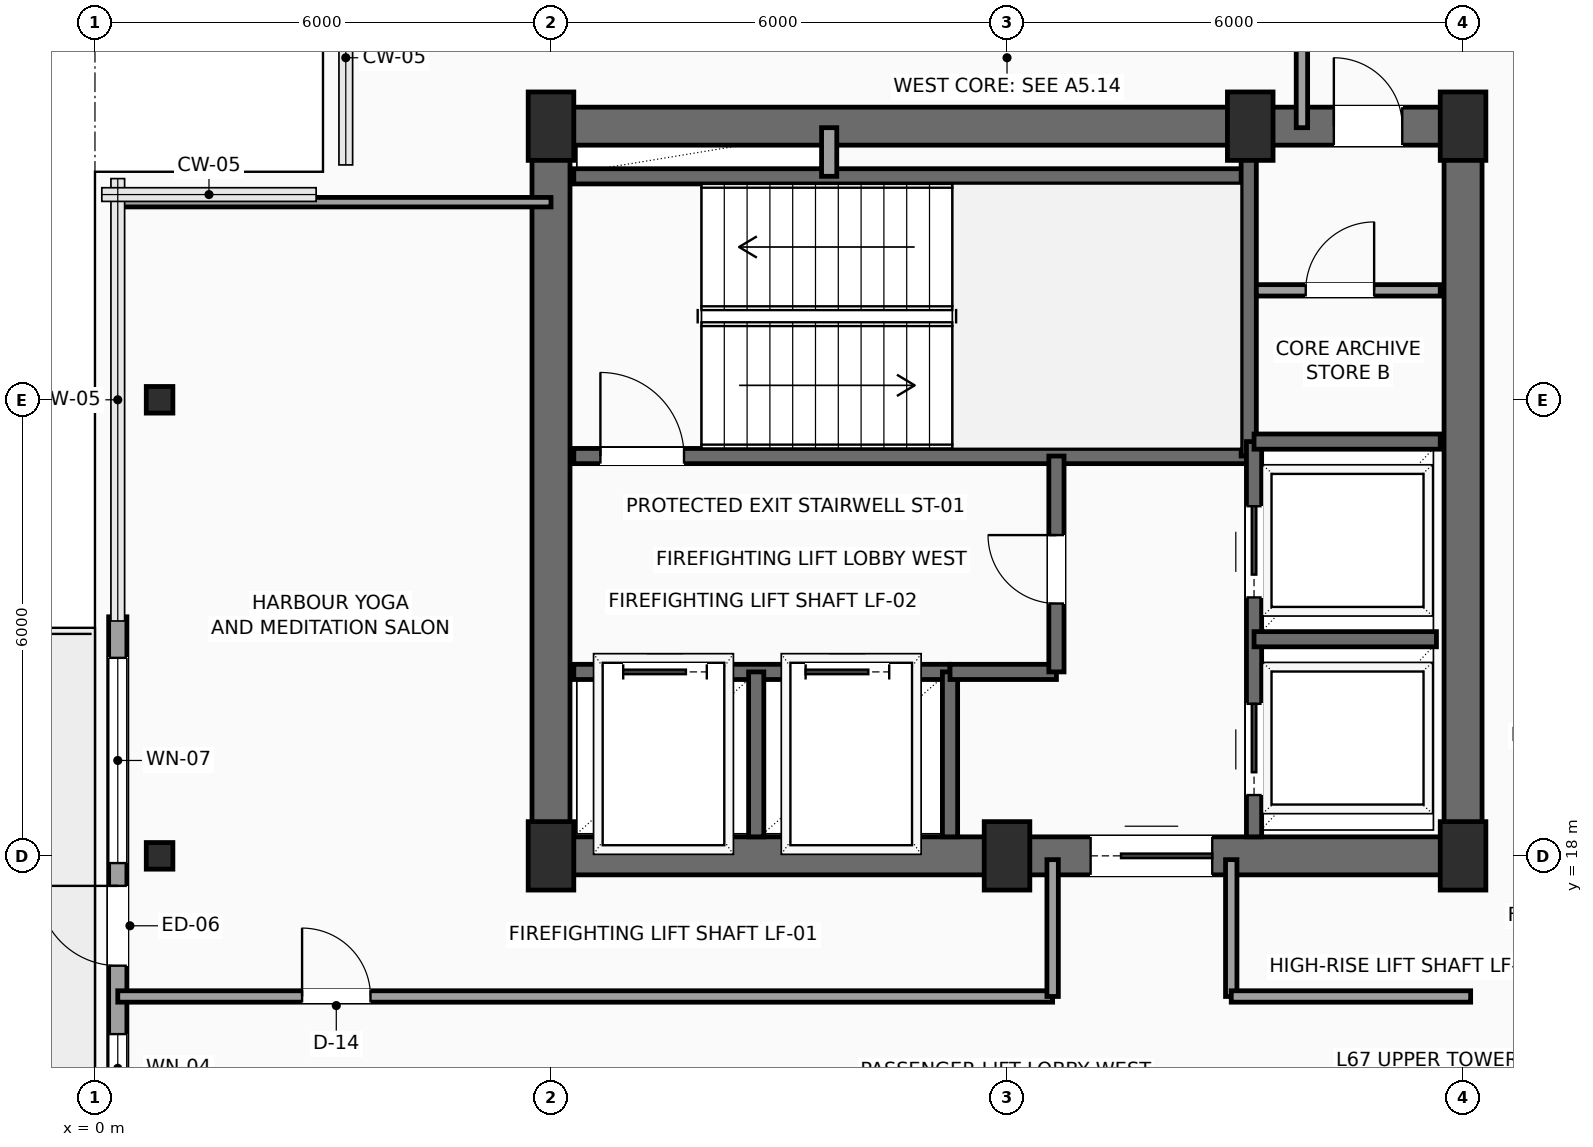
"""IFC4 building model, lengths in metres.
Left out: names, types, materials, properties, quantities, classifications, styles, units other than length and angle.
Written with IfcOpenShell. Run it as: python <this file> out.ifc"""

import sys

from ifc_helpers import new_model, si_unit, direction, frame, frame_2d, origin, origin_2d, place, context, subcontext, project, spatial, rectangle, hollow_rectangle, extrude, element, fill, save


model = new_model("IFC4")
c1 = context("Model", 3, precision=1e-05, world=origin(), true_north=direction((0.0, 1.0)))
c2 = subcontext(c1, "Body", "Model", "MODEL_VIEW")
j1 = project(units=[si_unit("LENGTHUNIT", "METRE"), si_unit("PLANEANGLEUNIT", "RADIAN")], contexts=[c1])
p1 = place(None, origin())
s1 = spatial("IfcSite", under=j1, at=p1, CompositionType="ELEMENT")
p2 = place(p1, origin())
s2 = spatial("IfcBuilding", under=s1, at=p2, CompositionType="ELEMENT")
p3 = place(p2, frame((0.0, 0.0, 267.7)))
s3 = spatial("IfcBuildingStorey", under=s2, at=p3, CompositionType="ELEMENT", Elevation=267.7)
for number, where, z_axis, x_axis in (
    (1, (6.0, 18.0, 0.0), (0.0, 0.0, 1.0), (1.0, 0.0, 0.0)),
    (2, (12.0, 18.0, 0.0), (0.0, 0.0, 1.0), (1.0, 0.0, 0.0)),
    (3, (18.0, 18.0, 0.0), (0.0, 0.0, 1.0), (1.0, 0.0, 0.0)),
    (4, (6.0, 27.6, 0.0), (0.0, 0.0, 1.0), (1.0, 0.0, 0.0)),
    (5, (15.2, 27.6, 0.0), (0.0, 0.0, 1.0), (1.0, 0.0, 0.0)),
    (6, (18.0, 27.6, 0.0), (0.0, 0.0, 1.0), (1.0, 0.0, 0.0)),
):
    element("IfcColumn", number, at=place(p3, frame(where, z_axis=z_axis, x_axis=x_axis)), inside=s3, PredefinedType="COLUMN", context=c2, shape_type="SweptSolid", body=[
        extrude(rectangle(XDim=0.6, YDim=0.9, at=origin_2d()), origin(), (0.0, 0.0, 1.0), 3.5),
    ])
for number, where, z_axis, x_axis in (
    (7, (0.85, 18.0, 0.0), (0.0, 0.0, 1.0), (1.0, 0.0, 0.0)),
    (8, (0.85, 24.0, 0.0), (0.0, 0.0, 1.0), (1.0, 0.0, 0.0)),
):
    element("IfcColumn", number, at=place(p3, frame(where, z_axis=z_axis, x_axis=x_axis)), inside=s3, PredefinedType="COLUMN", context=c2, shape_type="SweptSolid", body=[
        extrude(hollow_rectangle(XDim=0.35, YDim=0.35, WallThickness=0.016, InnerFilletRadius=0.016, OuterFilletRadius=0.032, at=origin_2d()), origin(), (0.0, 0.0, 1.0), 3.5),
    ])
p4 = place(p3, frame((0.3, 11.855, 0.0), z_axis=(0.0, 0.0, 1.0), x_axis=(0.0, 1.0, 0.0)))
e9 = element("IfcWall", 9, at=p4, inside=s3, PredefinedType="SOLIDWALL", context=c2, shape_type="SweptSolid", body=[
    extrude(rectangle(XDim=9.29, YDim=0.24, at=frame_2d((4.645, 0.0))), origin(), (0.0, 0.0, 1.0), 3.3),
])
p5 = place(p4, frame((4.7, 0.0, 0.0)))
e10 = element("IfcOpeningElement", 10, at=p5, cuts=e9, PredefinedType="OPENING", context=c2, shape_type="SweptSolid", body=[
    extrude(rectangle(XDim=1.05, YDim=2.2, at=frame_2d((0.525, 1.1))), frame((0.0, 0.13, 0.0), z_axis=(0.0, -1.0, 0.0), x_axis=(1.0, 0.0, 0.0)), (0.0, 0.0, 1.0), 0.26),
])
p6 = place(p4, frame((6.05, 0.0, 0.6)))
e11 = element("IfcOpeningElement", 11, at=p6, cuts=e9, PredefinedType="OPENING", context=c2, shape_type="SweptSolid", body=[
    extrude(rectangle(XDim=2.7, YDim=2.3, at=frame_2d((1.35, 1.15))), frame((0.0, 0.13, 0.0), z_axis=(0.0, -1.0, 0.0), x_axis=(1.0, 0.0, 0.0)), (0.0, 0.0, 1.0), 0.26),
])
p7 = place(p4, frame((2.9, 0.0, 0.6)))
e12 = element("IfcOpeningElement", 12, at=p7, cuts=e9, PredefinedType="OPENING", context=c2, shape_type="SweptSolid", body=[
    extrude(rectangle(XDim=0.9, YDim=2.2, at=frame_2d((0.45, 1.1))), frame((0.0, 0.13, 0.0), z_axis=(0.0, -1.0, 0.0), x_axis=(1.0, 0.0, 0.0)), (0.0, 0.0, 1.0), 0.26),
])
p8 = place(p3, frame((6.0, 18.0, 0.0), z_axis=(0.0, 0.0, 1.0), x_axis=(1.0, 0.0, 0.0)))
e13 = element("IfcWall", 13, at=p8, inside=s3, PredefinedType="SHEAR", context=c2, shape_type="SweptSolid", body=[
    extrude(rectangle(XDim=12.0, YDim=0.5, at=frame_2d((6.0, 0.0))), origin(), (0.0, 0.0, 1.0), 3.3),
])
p9 = place(p8, frame((7.1, 0.0, 0.0)))
e14 = element("IfcOpeningElement", 14, at=p9, cuts=e13, PredefinedType="OPENING", context=c2, shape_type="SweptSolid", body=[
    extrude(rectangle(XDim=1.6, YDim=2.3, at=frame_2d((0.8, 1.15))), frame((0.0, 0.26, 0.0), z_axis=(0.0, -1.0, 0.0), x_axis=(1.0, 0.0, 0.0)), (0.0, 0.0, 1.0), 0.52),
])
p10 = place(p3, frame((6.0, 27.6, 0.0), z_axis=(0.0, 0.0, 1.0), x_axis=(1.0, 0.0, 0.0)))
e15 = element("IfcWall", 15, at=p10, inside=s3, PredefinedType="SHEAR", context=c2, shape_type="SweptSolid", body=[
    extrude(rectangle(XDim=12.0, YDim=0.5, at=frame_2d((6.0, 0.0))), origin(), (0.0, 0.0, 1.0), 3.3),
])
p11 = place(p10, frame((10.3, 0.0, 0.0)))
e16 = element("IfcOpeningElement", 16, at=p11, cuts=e15, PredefinedType="OPENING", context=c2, shape_type="SweptSolid", body=[
    extrude(rectangle(XDim=0.9, YDim=2.15, at=frame_2d((0.45, 1.075))), frame((0.0, 0.26, 0.0), z_axis=(0.0, -1.0, 0.0), x_axis=(1.0, 0.0, 0.0)), (0.0, 0.0, 1.0), 0.52),
])
for number, where, z_axis, x_axis in (
    (17, (6.0, 18.0, 0.0), (0.0, 0.0, 1.0), (0.0, 1.0, 0.0)),
    (18, (18.0, 18.0, 0.0), (0.0, 0.0, 1.0), (0.0, 1.0, 0.0)),
):
    element("IfcWall", number, at=place(p3, frame(where, z_axis=z_axis, x_axis=x_axis)), inside=s3, PredefinedType="SHEAR", context=c2, shape_type="SweptSolid", body=[
        extrude(rectangle(XDim=9.6, YDim=0.5, at=frame_2d((4.8, 0.0))), origin(), (0.0, 0.0, 1.0), 3.3),
    ])
p12 = place(p3, frame((6.3, 23.26, 0.0), z_axis=(0.0, 0.0, 1.0), x_axis=(1.0, 0.0, 0.0)))
e19 = element("IfcWall", 19, at=p12, inside=s3, PredefinedType="SHEAR", context=c2, shape_type="SweptSolid", body=[
    extrude(rectangle(XDim=8.88, YDim=0.2, at=frame_2d((4.44, 0.0))), origin(), (0.0, 0.0, 1.0), 3.3),
])
p13 = place(p12, frame((0.35, 0.0, 0.0)))
e20 = element("IfcOpeningElement", 20, at=p13, cuts=e19, PredefinedType="OPENING", context=c2, shape_type="SweptSolid", body=[
    extrude(rectangle(XDim=1.1, YDim=2.2, at=frame_2d((0.55, 1.1))), frame((0.0, 0.11, 0.0), z_axis=(0.0, -1.0, 0.0), x_axis=(1.0, 0.0, 0.0)), (0.0, 0.0, 1.0), 0.22),
])
p14 = place(p3, frame((6.3, 26.94, 0.0), z_axis=(0.0, 0.0, 1.0), x_axis=(1.0, 0.0, 0.0)))
e21 = element("IfcWall", 21, at=p14, inside=s3, PredefinedType="SHEAR", context=c2, shape_type="SweptSolid", body=[
    extrude(rectangle(XDim=8.88, YDim=0.2, at=frame_2d((4.44, 0.0))), origin(), (0.0, 0.0, 1.0), 3.3),
])
p15 = place(p3, frame((15.18, 23.26, 0.0), z_axis=(0.0, 0.0, 1.0), x_axis=(0.0, 1.0, 0.0)))
e22 = element("IfcWall", 22, at=p15, inside=s3, PredefinedType="SHEAR", context=c2, shape_type="SweptSolid", body=[
    extrude(rectangle(XDim=4.04, YDim=0.2, at=frame_2d((2.02, 0.0))), origin(), (0.0, 0.0, 1.0), 3.3),
])
p16 = place(p3, frame((6.3, 20.42, 0.0), z_axis=(0.0, 0.0, 1.0), x_axis=(1.0, 0.0, 0.0)))
e23 = element("IfcWall", 23, at=p16, inside=s3, PredefinedType="SHEAR", context=c2, shape_type="SweptSolid", body=[
    extrude(rectangle(XDim=4.95, YDim=0.2, at=frame_2d((2.475, 0.0))), origin(), (0.0, 0.0, 1.0), 3.3),
])
p17 = place(p16, frame((0.65, 0.0, 0.0)))
e24 = element("IfcOpeningElement", 24, at=p17, cuts=e23, PredefinedType="OPENING", context=c2, shape_type="SweptSolid", body=[
    extrude(rectangle(XDim=1.1, YDim=2.2, at=frame_2d((0.55, 1.1))), frame((0.0, 0.11, 0.0), z_axis=(0.0, -1.0, 0.0), x_axis=(1.0, 0.0, 0.0)), (0.0, 0.0, 1.0), 0.22),
])
p18 = place(p16, frame((3.05, 0.0, 0.0)))
e25 = element("IfcOpeningElement", 25, at=p18, cuts=e23, PredefinedType="OPENING", context=c2, shape_type="SweptSolid", body=[
    extrude(rectangle(XDim=1.1, YDim=2.2, at=frame_2d((0.55, 1.1))), frame((0.0, 0.11, 0.0), z_axis=(0.0, -1.0, 0.0), x_axis=(1.0, 0.0, 0.0)), (0.0, 0.0, 1.0), 0.22),
])
for number, where, z_axis, x_axis in (
    (26, (8.7, 18.25, 0.0), (0.0, 0.0, 1.0), (0.0, 1.0, 0.0)),
    (27, (11.25, 18.25, 0.0), (0.0, 0.0, 1.0), (0.0, 1.0, 0.0)),
):
    element("IfcWall", number, at=place(p3, frame(where, z_axis=z_axis, x_axis=x_axis)), inside=s3, PredefinedType="SHEAR", context=c2, shape_type="SweptSolid", body=[
        extrude(rectangle(XDim=2.17, YDim=0.2, at=frame_2d((1.085, 0.0))), origin(), (0.0, 0.0, 1.0), 3.3),
    ])
p19 = place(p3, frame((11.25, 20.42, 0.0), z_axis=(0.0, 0.0, 1.0), x_axis=(1.0, 0.0, 0.0)))
e28 = element("IfcWall", 28, at=p19, inside=s3, PredefinedType="SHEAR", context=c2, shape_type="SweptSolid", body=[
    extrude(rectangle(XDim=1.4, YDim=0.2, at=frame_2d((0.7, 0.0))), origin(), (0.0, 0.0, 1.0), 3.3),
])
p20 = place(p3, frame((12.65, 20.42, 0.0), z_axis=(0.0, 0.0, 1.0), x_axis=(0.0, 1.0, 0.0)))
e29 = element("IfcWall", 29, at=p20, inside=s3, PredefinedType="SHEAR", context=c2, shape_type="SweptSolid", body=[
    extrude(rectangle(XDim=2.84, YDim=0.2, at=frame_2d((1.42, 0.0))), origin(), (0.0, 0.0, 1.0), 3.3),
])
p21 = place(p20, frame((0.9, 0.0, 0.0)))
e30 = element("IfcOpeningElement", 30, at=p21, cuts=e29, PredefinedType="OPENING", context=c2, shape_type="SweptSolid", body=[
    extrude(rectangle(XDim=0.9, YDim=2.15, at=frame_2d((0.45, 1.075))), frame((0.0, 0.11, 0.0), z_axis=(0.0, -1.0, 0.0), x_axis=(1.0, 0.0, 0.0)), (0.0, 0.0, 1.0), 0.22),
])
p22 = place(p3, frame((9.66, 26.94, 0.0), z_axis=(0.0, 0.0, 1.0), x_axis=(0.0, 1.0, 0.0)))
e31 = element("IfcWall", 31, at=p22, inside=s3, PredefinedType="SOLIDWALL", context=c2, shape_type="SweptSolid", body=[
    extrude(rectangle(XDim=0.64, YDim=0.2, at=frame_2d((0.32, 0.0))), origin(), (0.0, 0.0, 1.0), 3.3),
])
p23 = place(p3, frame((15.25, 18.25, 0.0), z_axis=(0.0, 0.0, 1.0), x_axis=(0.0, 1.0, 0.0)))
e32 = element("IfcWall", 32, at=p23, inside=s3, PredefinedType="SHEAR", context=c2, shape_type="SweptSolid", body=[
    extrude(rectangle(XDim=5.2, YDim=0.2, at=frame_2d((2.6, 0.0))), origin(), (0.0, 0.0, 1.0), 3.3),
])
p24 = place(p23, frame((0.55, 0.0, 0.0)))
e33 = element("IfcOpeningElement", 33, at=p24, cuts=e32, PredefinedType="OPENING", context=c2, shape_type="SweptSolid", body=[
    extrude(rectangle(XDim=1.2, YDim=2.2, at=frame_2d((0.6, 1.1))), frame((0.0, 0.11, 0.0), z_axis=(0.0, -1.0, 0.0), x_axis=(1.0, 0.0, 0.0)), (0.0, 0.0, 1.0), 0.22),
])
p25 = place(p23, frame((3.15, 0.0, 0.0)))
e34 = element("IfcOpeningElement", 34, at=p25, cuts=e32, PredefinedType="OPENING", context=c2, shape_type="SweptSolid", body=[
    extrude(rectangle(XDim=1.2, YDim=2.2, at=frame_2d((0.6, 1.1))), frame((0.0, 0.11, 0.0), z_axis=(0.0, -1.0, 0.0), x_axis=(1.0, 0.0, 0.0)), (0.0, 0.0, 1.0), 0.22),
])
p26 = place(p3, frame((15.25, 20.85, 0.0), z_axis=(0.0, 0.0, 1.0), x_axis=(1.0, 0.0, 0.0)))
e35 = element("IfcWall", 35, at=p26, inside=s3, PredefinedType="SHEAR", context=c2, shape_type="SweptSolid", body=[
    extrude(rectangle(XDim=2.4, YDim=0.2, at=frame_2d((1.2, 0.0))), origin(), (0.0, 0.0, 1.0), 3.3),
])
p27 = place(p3, frame((15.25, 23.45, 0.0), z_axis=(0.0, 0.0, 1.0), x_axis=(1.0, 0.0, 0.0)))
e36 = element("IfcWall", 36, at=p27, inside=s3, PredefinedType="SHEAR", context=c2, shape_type="SweptSolid", body=[
    extrude(rectangle(XDim=2.45, YDim=0.2, at=frame_2d((1.225, 0.0))), origin(), (0.0, 0.0, 1.0), 3.3),
])
p28 = place(p3, frame((15.28, 25.44, 0.0), z_axis=(0.0, 0.0, 1.0), x_axis=(1.0, 0.0, 0.0)))
e37 = element("IfcWall", 37, at=p28, inside=s3, PredefinedType="PARTITIONING", context=c2, shape_type="SweptSolid", body=[
    extrude(rectangle(XDim=2.42, YDim=0.15, at=frame_2d((1.21, 0.0))), origin(), (0.0, 0.0, 1.0), 3.3),
])
p29 = place(p28, frame((0.65, 0.0, 0.0)))
e38 = element("IfcOpeningElement", 38, at=p29, cuts=e37, PredefinedType="OPENING", context=c2, shape_type="SweptSolid", body=[
    extrude(rectangle(XDim=0.9, YDim=2.15, at=frame_2d((0.45, 1.075))), frame((0.0, 0.085, 0.0), z_axis=(0.0, -1.0, 0.0), x_axis=(1.0, 0.0, 0.0)), (0.0, 0.0, 1.0), 0.17),
])
p30 = place(p3, frame((0.3, 16.15, 0.0), z_axis=(0.0, 0.0, 1.0), x_axis=(1.0, 0.0, 0.0)))
e39 = element("IfcWall", 39, at=p30, inside=s3, PredefinedType="PARTITIONING", context=c2, shape_type="SweptSolid", body=[
    extrude(rectangle(XDim=12.3, YDim=0.15, at=frame_2d((6.15, 0.0))), origin(), (0.0, 0.0, 1.0), 3.3),
])
p31 = place(p30, frame((2.425, 0.0, 0.0)))
e40 = element("IfcOpeningElement", 40, at=p31, cuts=e39, PredefinedType="OPENING", context=c2, shape_type="SweptSolid", body=[
    extrude(rectangle(XDim=0.9, YDim=2.1, at=frame_2d((0.45, 1.05))), frame((0.0, 0.085, 0.0), z_axis=(0.0, -1.0, 0.0), x_axis=(1.0, 0.0, 0.0)), (0.0, 0.0, 1.0), 0.17),
])
for number, where, z_axis, x_axis in (
    (41, (12.6, 16.15, 0.0), (0.0, 0.0, 1.0), (0.0, 1.0, 0.0)),
    (42, (14.95, 17.95, 0.0), (0.0, 0.0, 1.0), (0.0, -1.0, 0.0)),
):
    element("IfcWall", number, at=place(p3, frame(where, z_axis=z_axis, x_axis=x_axis)), inside=s3, PredefinedType="PARTITIONING", context=c2, shape_type="SweptSolid", body=[
        extrude(rectangle(XDim=1.8, YDim=0.15, at=frame_2d((0.9, 0.0))), origin(), (0.0, 0.0, 1.0), 3.3),
    ])
p32 = place(p3, frame((14.95, 16.15, 0.0), z_axis=(0.0, 0.0, 1.0), x_axis=(1.0, 0.0, 0.0)))
e43 = element("IfcWall", 43, at=p32, inside=s3, PredefinedType="PARTITIONING", context=c2, shape_type="SweptSolid", body=[
    extrude(rectangle(XDim=3.15, YDim=0.15, at=frame_2d((1.575, 0.0))), origin(), (0.0, 0.0, 1.0), 3.3),
])
p33 = place(p3, frame((15.88, 27.58, 0.0), z_axis=(0.0, 0.0, 1.0), x_axis=(0.0, 1.0, 0.0)))
e44 = element("IfcWall", 44, at=p33, inside=s3, PredefinedType="PARTITIONING", context=c2, shape_type="SweptSolid", body=[
    extrude(rectangle(XDim=2.12, YDim=0.15, at=frame_2d((1.06, 0.0))), origin(), (0.0, 0.0, 1.0), 3.3),
])
p34 = place(p3, frame((0.3, 26.6, 0.0), z_axis=(0.0, 0.0, 1.0), x_axis=(1.0, 0.0, 0.0)))
e45 = element("IfcWall", 45, at=p34, inside=s3, PredefinedType="PARTITIONING", context=c2, shape_type="SweptSolid", body=[
    extrude(rectangle(XDim=5.7, YDim=0.125, at=frame_2d((2.85, 0.0))), origin(), (0.0, 0.0, 1.0), 3.3),
])
p35 = place(p5, origin())
e46 = element("IfcDoor", 46, at=p35, inside=s3, OperationType="SINGLE_SWING_RIGHT", PredefinedType="DOOR", context=c2, shape_type="SweptSolid", body=[
    extrude(rectangle(XDim=1.05, YDim=2.2, at=frame_2d((0.525, 1.1))), frame((0.0, 0.025, 0.0), z_axis=(0.0, -1.0, 0.0), x_axis=(1.0, 0.0, 0.0)), (0.0, 0.0, 1.0), 0.05),
])
fill(e10, e46)
p36 = place(p6, origin())
e47 = element("IfcWindow", 47, at=p36, inside=s3, PartitioningType="SINGLE_PANEL", PredefinedType="WINDOW", context=c2, shape_type="SweptSolid", body=[
    extrude(rectangle(XDim=2.7, YDim=2.3, at=frame_2d((1.35, 1.15))), frame((0.0, 0.03, 0.0), z_axis=(0.0, -1.0, 0.0), x_axis=(1.0, 0.0, 0.0)), (0.0, 0.0, 1.0), 0.06),
])
fill(e11, e47)
p37 = place(p7, origin())
e48 = element("IfcWindow", 48, at=p37, inside=s3, PartitioningType="SINGLE_PANEL", PredefinedType="WINDOW", context=c2, shape_type="SweptSolid", body=[
    extrude(rectangle(XDim=0.9, YDim=2.2, at=frame_2d((0.45, 1.1))), frame((0.0, 0.03, 0.0), z_axis=(0.0, -1.0, 0.0), x_axis=(1.0, 0.0, 0.0)), (0.0, 0.0, 1.0), 0.06),
])
fill(e12, e48)
p38 = place(p9, origin())
e49 = element("IfcDoor", 49, at=p38, inside=s3, OperationType="DOUBLE_DOOR_SLIDING", PredefinedType="DOOR", context=c2, shape_type="SweptSolid", body=[
    extrude(rectangle(XDim=1.6, YDim=2.3, at=frame_2d((0.8, 1.15))), frame((0.0, 0.025, 0.0), z_axis=(0.0, -1.0, 0.0), x_axis=(1.0, 0.0, 0.0)), (0.0, 0.0, 1.0), 0.05),
])
fill(e14, e49)
p39 = place(p11, origin())
e50 = element("IfcDoor", 50, at=p39, inside=s3, OperationType="SINGLE_SWING_LEFT", PredefinedType="DOOR", context=c2, shape_type="SweptSolid", body=[
    extrude(rectangle(XDim=0.9, YDim=2.15, at=frame_2d((0.45, 1.075))), frame((0.0, 0.025, 0.0), z_axis=(0.0, -1.0, 0.0), x_axis=(1.0, 0.0, 0.0)), (0.0, 0.0, 1.0), 0.05),
])
fill(e16, e50)
p40 = place(p13, origin())
e51 = element("IfcDoor", 51, at=p40, inside=s3, OperationType="SINGLE_SWING_LEFT", PredefinedType="DOOR", context=c2, shape_type="SweptSolid", body=[
    extrude(rectangle(XDim=1.1, YDim=2.2, at=frame_2d((0.55, 1.1))), frame((0.0, 0.025, 0.0), z_axis=(0.0, -1.0, 0.0), x_axis=(1.0, 0.0, 0.0)), (0.0, 0.0, 1.0), 0.05),
])
fill(e20, e51)
p41 = place(p17, origin())
e52 = element("IfcDoor", 52, at=p41, inside=s3, OperationType="SLIDING_TO_LEFT", PredefinedType="DOOR", context=c2, shape_type="SweptSolid", body=[
    extrude(rectangle(XDim=1.1, YDim=2.2, at=frame_2d((0.55, 1.1))), frame((0.0, 0.025, 0.0), z_axis=(0.0, -1.0, 0.0), x_axis=(1.0, 0.0, 0.0)), (0.0, 0.0, 1.0), 0.05),
])
fill(e24, e52)
p42 = place(p18, origin())
e53 = element("IfcDoor", 53, at=p42, inside=s3, OperationType="SLIDING_TO_LEFT", PredefinedType="DOOR", context=c2, shape_type="SweptSolid", body=[
    extrude(rectangle(XDim=1.1, YDim=2.2, at=frame_2d((0.55, 1.1))), frame((0.0, 0.025, 0.0), z_axis=(0.0, -1.0, 0.0), x_axis=(1.0, 0.0, 0.0)), (0.0, 0.0, 1.0), 0.05),
])
fill(e25, e53)
p43 = place(p21, origin())
e54 = element("IfcDoor", 54, at=p43, inside=s3, OperationType="SINGLE_SWING_RIGHT", PredefinedType="DOOR", context=c2, shape_type="SweptSolid", body=[
    extrude(rectangle(XDim=0.9, YDim=2.15, at=frame_2d((0.45, 1.075))), frame((0.0, 0.025, 0.0), z_axis=(0.0, -1.0, 0.0), x_axis=(1.0, 0.0, 0.0)), (0.0, 0.0, 1.0), 0.05),
])
fill(e30, e54)
p44 = place(p24, origin())
e55 = element("IfcDoor", 55, at=p44, inside=s3, OperationType="SLIDING_TO_RIGHT", PredefinedType="DOOR", context=c2, shape_type="SweptSolid", body=[
    extrude(rectangle(XDim=1.2, YDim=2.2, at=frame_2d((0.6, 1.1))), frame((0.0, 0.025, 0.0), z_axis=(0.0, -1.0, 0.0), x_axis=(1.0, 0.0, 0.0)), (0.0, 0.0, 1.0), 0.05),
])
fill(e33, e55)
p45 = place(p25, origin())
e56 = element("IfcDoor", 56, at=p45, inside=s3, OperationType="SLIDING_TO_RIGHT", PredefinedType="DOOR", context=c2, shape_type="SweptSolid", body=[
    extrude(rectangle(XDim=1.2, YDim=2.2, at=frame_2d((0.6, 1.1))), frame((0.0, 0.025, 0.0), z_axis=(0.0, -1.0, 0.0), x_axis=(1.0, 0.0, 0.0)), (0.0, 0.0, 1.0), 0.05),
])
fill(e34, e56)
p46 = place(p29, origin())
e57 = element("IfcDoor", 57, at=p46, inside=s3, OperationType="SINGLE_SWING_RIGHT", PredefinedType="DOOR", context=c2, shape_type="SweptSolid", body=[
    extrude(rectangle(XDim=0.9, YDim=2.15, at=frame_2d((0.45, 1.075))), frame((0.0, 0.025, 0.0), z_axis=(0.0, -1.0, 0.0), x_axis=(1.0, 0.0, 0.0)), (0.0, 0.0, 1.0), 0.05),
])
fill(e38, e57)
p47 = place(p31, origin())
e58 = element("IfcDoor", 58, at=p47, inside=s3, OperationType="SINGLE_SWING_LEFT", PredefinedType="DOOR", context=c2, shape_type="SweptSolid", body=[
    extrude(rectangle(XDim=0.9, YDim=2.1, at=frame_2d((0.45, 1.05))), frame((0.0, 0.025, 0.0), z_axis=(0.0, -1.0, 0.0), x_axis=(1.0, 0.0, 0.0)), (0.0, 0.0, 1.0), 0.05),
])
fill(e40, e58)
save(model, sys.argv[1])
